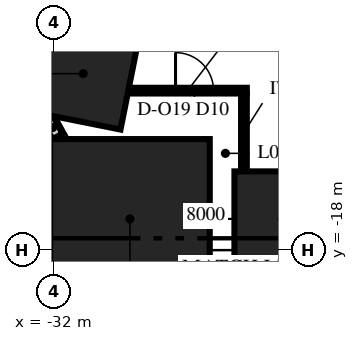
"""IFC4 building model, lengths in metres.
Left out: names, types, materials, properties, quantities, classifications, styles, units other than length and angle.
Written with IfcOpenShell. Run it as: python <this file> out.ifc"""

import sys

from ifc_helpers import new_model, si_unit, direction, frame, frame_2d, origin, origin_2d, place, context, subcontext, project, spatial, rectangle, extrude, element, fill, save


model = new_model("IFC4")
c1 = context("Model", 3, precision=1e-05, world=origin(), true_north=direction((0.0, 1.0)))
c2 = subcontext(c1, "Body", "Model", "MODEL_VIEW")
j1 = project(units=[si_unit("LENGTHUNIT", "METRE"), si_unit("PLANEANGLEUNIT", "RADIAN")], contexts=[c1])
p1 = place(None, origin())
s1 = spatial("IfcSite", under=j1, at=p1, CompositionType="ELEMENT")
p2 = place(p1, origin())
s2 = spatial("IfcBuilding", under=s1, at=p2, CompositionType="ELEMENT")
p3 = place(p2, frame((0.0, 0.0, 28.0)))
s3 = spatial("IfcBuildingStorey", under=s2, at=p3, CompositionType="ELEMENT", Elevation=28.0)
p4 = place(p3, frame((-30.0, -17.175, -1.25), z_axis=(0.0, 0.0, 1.0), x_axis=(1.0, 0.0, 0.0)))
e1 = element("IfcColumn", 1, at=p4, inside=s3, PredefinedType="COLUMN", context=c2, shape_type="SweptSolid", body=[
    extrude(rectangle(XDim=4.2, YDim=4.2, at=origin_2d()), origin(), (0.0, 0.0, 1.0), 5.25),
])
p5 = place(p3, frame((-26.0, -17.175, -1.25), z_axis=(0.0, 0.0, 1.0), x_axis=(1.0, 0.0, 0.0)))
e2 = element("IfcColumn", 2, at=p5, inside=s3, PredefinedType="COLUMN", context=c2, shape_type="SweptSolid", body=[
    extrude(rectangle(XDim=2.5, YDim=2.5, at=origin_2d()), origin(), (0.0, 0.0, 1.0), 5.25),
])
p6 = place(p3, frame((-31.229, -13.353, -0.85), z_axis=(0.0, 0.0, 1.0), x_axis=(-0.196116135138, -0.980580675691, 0.0)))
e3 = element("IfcColumn", 3, at=p6, inside=s3, PredefinedType="COLUMN", context=c2, shape_type="SweptSolid", body=[
    extrude(rectangle(XDim=2.5, YDim=2.5, at=origin_2d()), origin(), (0.0, 0.0, 1.0), 4.85),
])
p7 = place(p3, frame((-32.16, -14.539, 0.0), z_axis=(0.0, 0.0, 1.0), x_axis=(0.481848081358, -0.876254772593, 0.0)))
e4 = element("IfcWall", 4, at=p7, inside=s3, PredefinedType="SOLIDWALL", context=c2, shape_type="SweptSolid", body=[
    extrude(rectangle(XDim=0.531, YDim=0.3, at=frame_2d((0.265, 0.0))), origin(), (0.0, 0.0, 1.0), 4.0),
])
p8 = place(p3, frame((-30.044, -13.8, 0.0), z_axis=(0.0, 0.0, 1.0), x_axis=(1.0, 0.0, 0.0)))
e5 = element("IfcWall", 5, at=p8, inside=s3, PredefinedType="PARTITIONING", context=c2, shape_type="SweptSolid", body=[
    extrude(rectangle(XDim=3.119, YDim=0.15, at=frame_2d((1.56, 0.0))), origin(), (0.0, 0.0, 1.0), 3.85),
])
p9 = place(p8, frame((1.244, 0.0, 0.0)))
e6 = element("IfcOpeningElement", 6, at=p9, cuts=e5, PredefinedType="OPENING", context=c2, shape_type="SweptSolid", body=[
    extrude(rectangle(XDim=1.0, YDim=2.3, at=frame_2d((0.5, 1.15))), frame((0.0, 0.09, 0.0), z_axis=(0.0, -1.0, 0.0), x_axis=(1.0, 0.0, 0.0)), (0.0, 0.0, 1.0), 0.18),
])
p10 = place(p3, frame((-27.0, -15.925, 0.0), z_axis=(0.0, 0.0, 1.0), x_axis=(0.0, 1.0, 0.0)))
e7 = element("IfcWall", 7, at=p10, inside=s3, PredefinedType="PARTITIONING", context=c2, shape_type="SweptSolid", body=[
    extrude(rectangle(XDim=2.05, YDim=0.15, at=frame_2d((1.025, 0.0))), origin(), (0.0, 0.0, 1.0), 3.85),
])
p11 = place(p9, origin())
e8 = element("IfcDoor", 8, at=p11, inside=s3, OperationType="SINGLE_SWING_LEFT", PredefinedType="DOOR", context=c2, shape_type="SweptSolid", body=[
    extrude(rectangle(XDim=1.0, YDim=2.3, at=frame_2d((0.5, 1.15))), frame((0.0, 0.075, 0.0), z_axis=(0.0, -1.0, 0.0), x_axis=(1.0, 0.0, 0.0)), (0.0, 0.0, 1.0), 0.149),
])
fill(e6, e8)
save(model, sys.argv[1])
